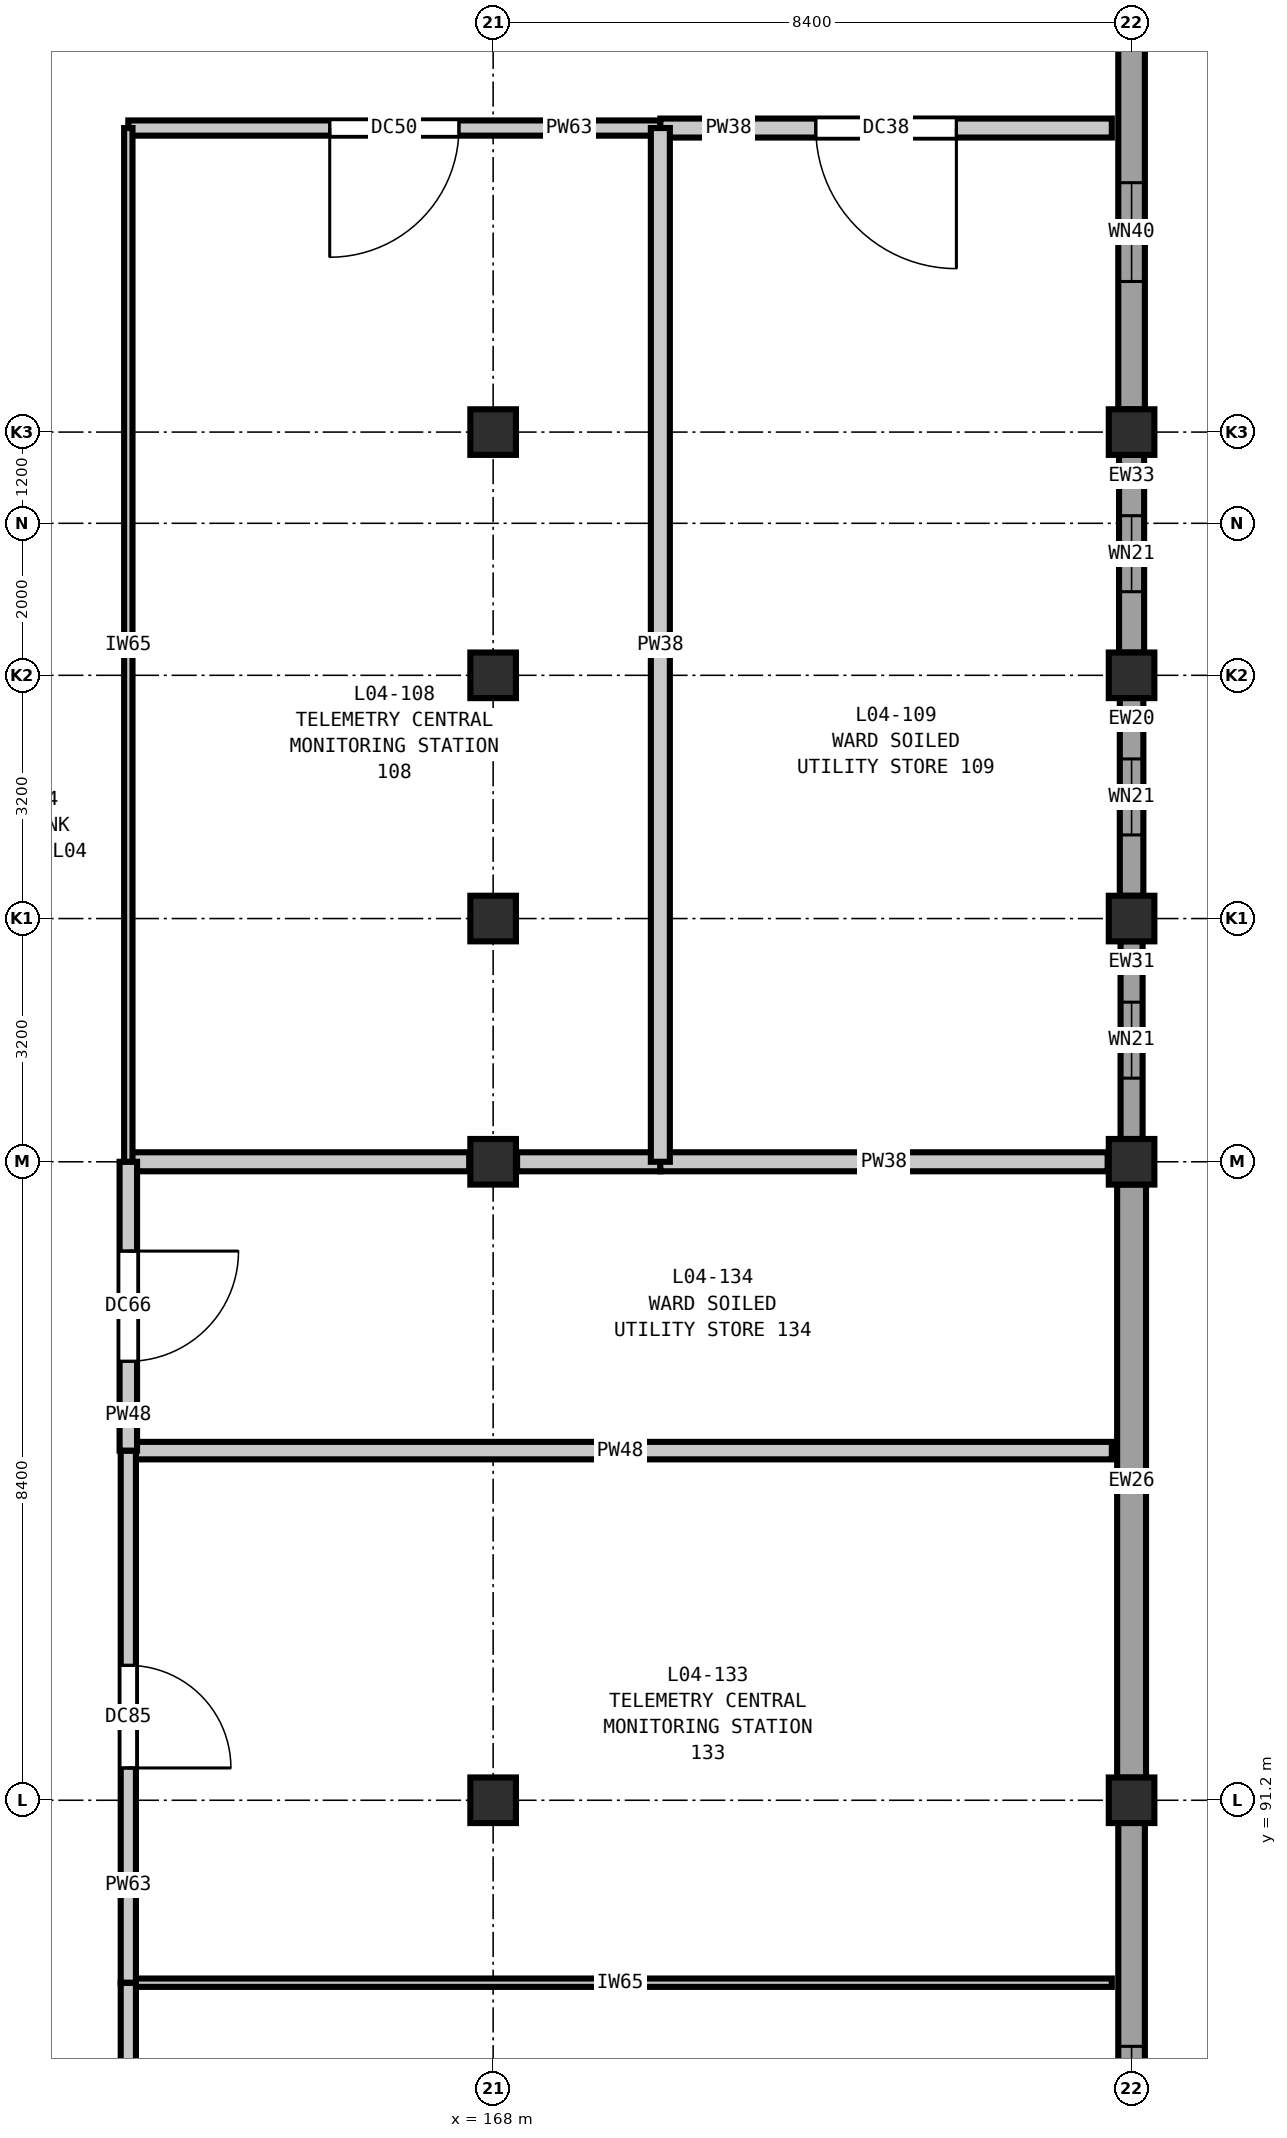
"""IFC4 building model, lengths in metres.
Left out: names, types, materials, properties, quantities, classifications, styles, units other than length and angle.
Written with IfcOpenShell. Run it as: python <this file> out.ifc"""

import sys

from ifc_helpers import new_model, si_unit, direction, frame, frame_2d, origin, origin_2d, place, context, subcontext, project, spatial, rectangle, extrude, element, fill, save


model = new_model("IFC4")
c1 = context("Model", 3, precision=1e-05, world=origin(), true_north=direction((0.0, 1.0)))
c2 = subcontext(c1, "Body", "Model", "MODEL_VIEW")
j1 = project(units=[si_unit("LENGTHUNIT", "METRE"), si_unit("PLANEANGLEUNIT", "RADIAN")], contexts=[c1])
p1 = place(None, origin())
s1 = spatial("IfcSite", under=j1, at=p1, CompositionType="ELEMENT")
p2 = place(p1, origin())
s2 = spatial("IfcBuilding", under=s1, at=p2, CompositionType="ELEMENT")
p3 = place(p2, frame((0.0, 0.0, 20.4)))
s3 = spatial("IfcBuildingStorey", under=s2, at=p3, CompositionType="ELEMENT", Elevation=20.4)
for number, where, z_axis, x_axis in (
    (1, (168.0, 91.2, 0.0), (0.0, 0.0, 1.0), (1.0, 0.0, 0.0)),
    (2, (168.0, 99.6, 0.0), (0.0, 0.0, 1.0), (1.0, 0.0, 0.0)),
    (3, (168.0, 102.8, 0.0), (0.0, 0.0, 1.0), (1.0, 0.0, 0.0)),
    (4, (168.0, 106.0, 0.0), (0.0, 0.0, 1.0), (1.0, 0.0, 0.0)),
    (5, (168.0, 109.2, 0.0), (0.0, 0.0, 1.0), (1.0, 0.0, 0.0)),
    (6, (176.4, 91.2, 0.0), (0.0, 0.0, 1.0), (1.0, 0.0, 0.0)),
    (7, (176.4, 99.6, 0.0), (0.0, 0.0, 1.0), (1.0, 0.0, 0.0)),
    (8, (176.4, 102.8, 0.0), (0.0, 0.0, 1.0), (1.0, 0.0, 0.0)),
    (9, (176.4, 106.0, 0.0), (0.0, 0.0, 1.0), (1.0, 0.0, 0.0)),
    (10, (176.4, 109.2, 0.0), (0.0, 0.0, 1.0), (1.0, 0.0, 0.0)),
):
    element("IfcColumn", number, at=place(p3, frame(where, z_axis=z_axis, x_axis=x_axis)), inside=s3, PredefinedType="COLUMN", context=c2, shape_type="SweptSolid", body=[
        extrude(rectangle(XDim=0.6, YDim=0.6, at=origin_2d()), origin(), (0.0, 0.0, 1.0), 4.2),
    ])
p4 = place(p3, frame((176.4, 116.102, 0.0), z_axis=(0.0, 0.0, 1.0), x_axis=(0.0, -1.0, 0.0)))
e11 = element("IfcWall", 11, at=p4, inside=s3, PredefinedType="SOLIDWALL", context=c2, shape_type="SweptSolid", body=[
    extrude(rectangle(XDim=6.604, YDim=0.35, at=frame_2d((3.302, 0.0))), origin(), (0.0, 0.0, 1.0), 3.48),
])
p5 = place(p4, frame((3.621, 0.0, 0.9)))
e12 = element("IfcOpeningElement", 12, at=p5, cuts=e11, PredefinedType="OPENING", context=c2, shape_type="SweptSolid", body=[
    extrude(rectangle(XDim=1.3, YDim=1.75, at=frame_2d((0.65, 0.875))), frame((0.0, 0.185, 0.0), z_axis=(0.0, -1.0, 0.0), x_axis=(1.0, 0.0, 0.0)), (0.0, 0.0, 1.0), 0.37),
])
p6 = place(p3, frame((176.4, 108.902, 0.0), z_axis=(0.0, 0.0, 1.0), x_axis=(0.0, -1.0, 0.0)))
e13 = element("IfcWall", 13, at=p6, inside=s3, PredefinedType="SOLIDWALL", context=c2, shape_type="SweptSolid", body=[
    extrude(rectangle(XDim=2.604, YDim=0.33, at=frame_2d((1.302, 0.0))), origin(), (0.0, 0.0, 1.0), 3.48),
])
p7 = place(p6, frame((0.802, 0.0, 0.9)))
e14 = element("IfcOpeningElement", 14, at=p7, cuts=e13, PredefinedType="OPENING", context=c2, shape_type="SweptSolid", body=[
    extrude(rectangle(XDim=1.0, YDim=1.55, at=frame_2d((0.5, 0.775))), frame((0.0, 0.175, 0.0), z_axis=(0.0, -1.0, 0.0), x_axis=(1.0, 0.0, 0.0)), (0.0, 0.0, 1.0), 0.35),
])
p8 = place(p3, frame((176.4, 105.702, 0.0), z_axis=(0.0, 0.0, 1.0), x_axis=(0.0, -1.0, 0.0)))
e15 = element("IfcWall", 15, at=p8, inside=s3, PredefinedType="SOLIDWALL", context=c2, shape_type="SweptSolid", body=[
    extrude(rectangle(XDim=2.604, YDim=0.31, at=frame_2d((1.302, 0.0))), origin(), (0.0, 0.0, 1.0), 3.48),
])
p9 = place(p8, frame((0.802, 0.0, 0.9)))
e16 = element("IfcOpeningElement", 16, at=p9, cuts=e15, PredefinedType="OPENING", context=c2, shape_type="SweptSolid", body=[
    extrude(rectangle(XDim=1.0, YDim=1.55, at=frame_2d((0.5, 0.775))), frame((0.0, 0.165, 0.0), z_axis=(0.0, -1.0, 0.0), x_axis=(1.0, 0.0, 0.0)), (0.0, 0.0, 1.0), 0.33),
])
p10 = place(p3, frame((176.4, 102.502, 0.0), z_axis=(0.0, 0.0, 1.0), x_axis=(0.0, -1.0, 0.0)))
e17 = element("IfcWall", 17, at=p10, inside=s3, PredefinedType="SOLIDWALL", context=c2, shape_type="SweptSolid", body=[
    extrude(rectangle(XDim=2.604, YDim=0.29, at=frame_2d((1.302, 0.0))), origin(), (0.0, 0.0, 1.0), 3.48),
])
p11 = place(p10, frame((0.802, 0.0, 0.9)))
e18 = element("IfcOpeningElement", 18, at=p11, cuts=e17, PredefinedType="OPENING", context=c2, shape_type="SweptSolid", body=[
    extrude(rectangle(XDim=1.0, YDim=1.55, at=frame_2d((0.5, 0.775))), frame((0.0, 0.155, 0.0), z_axis=(0.0, -1.0, 0.0), x_axis=(1.0, 0.0, 0.0)), (0.0, 0.0, 1.0), 0.31),
])
p12 = place(p3, frame((176.4, 99.302, 0.0), z_axis=(0.0, 0.0, 1.0), x_axis=(0.0, -1.0, 0.0)))
e19 = element("IfcWall", 19, at=p12, inside=s3, PredefinedType="SOLIDWALL", context=c2, shape_type="SweptSolid", body=[
    extrude(rectangle(XDim=7.804, YDim=0.38, at=frame_2d((3.902, 0.0))), origin(), (0.0, 0.0, 1.0), 3.48),
])
p13 = place(p3, frame((176.4, 90.902, 0.0), z_axis=(0.0, 0.0, 1.0), x_axis=(0.0, -1.0, 0.0)))
e20 = element("IfcWall", 20, at=p13, inside=s3, PredefinedType="SOLIDWALL", context=c2, shape_type="SweptSolid", body=[
    extrude(rectangle(XDim=7.829, YDim=0.35, at=frame_2d((3.915, 0.0))), origin(), (0.0, 0.0, 1.0), 3.48),
])
p14 = place(p13, frame((2.939, 0.0, 0.9)))
e21 = element("IfcOpeningElement", 21, at=p14, cuts=e20, PredefinedType="OPENING", context=c2, shape_type="SweptSolid", body=[
    extrude(rectangle(XDim=1.95, YDim=1.75, at=frame_2d((0.975, 0.875))), frame((0.0, 0.185, 0.0), z_axis=(0.0, -1.0, 0.0), x_axis=(1.0, 0.0, 0.0)), (0.0, 0.0, 1.0), 0.37),
])
p15 = place(p3, frame((163.2, 88.8, 0.0), z_axis=(0.0, 0.0, 1.0), x_axis=(1.0, 0.0, 0.0)))
e22 = element("IfcWall", 22, at=p15, inside=s3, PredefinedType="PARTITIONING", context=c2, shape_type="SweptSolid", body=[
    extrude(rectangle(XDim=12.94, YDim=0.11, at=frame_2d((6.47, 0.0))), origin(), (0.0, 0.0, 1.0), 3.82),
])
p16 = place(p3, frame((163.2, 95.8, 0.0), z_axis=(0.0, 0.0, 1.0), x_axis=(1.0, 0.0, 0.0)))
e23 = element("IfcWall", 23, at=p16, inside=s3, PredefinedType="PARTITIONING", context=c2, shape_type="SweptSolid", body=[
    extrude(rectangle(XDim=12.94, YDim=0.23, at=frame_2d((6.47, 0.0))), origin(), (0.0, 0.0, 1.0), 3.82),
])
p17 = place(p3, frame((163.2, 99.6, 0.0), z_axis=(0.0, 0.0, 1.0), x_axis=(1.0, 0.0, 0.0)))
e24 = element("IfcWall", 24, at=p17, inside=s3, PredefinedType="PARTITIONING", context=c2, shape_type="SweptSolid", body=[
    extrude(rectangle(XDim=4.485, YDim=0.25, at=frame_2d((2.243, 0.0))), origin(), (0.0, 0.0, 1.0), 3.585),
])
p18 = place(p3, frame((168.315, 99.6, 0.0), z_axis=(0.0, 0.0, 1.0), x_axis=(1.0, 0.0, 0.0)))
e25 = element("IfcWall", 25, at=p18, inside=s3, PredefinedType="PARTITIONING", context=c2, shape_type="SweptSolid", body=[
    extrude(rectangle(XDim=1.885, YDim=0.25, at=frame_2d((0.942, 0.0))), origin(), (0.0, 0.0, 1.0), 3.585),
])
p19 = place(p3, frame((170.2, 99.6, 0.0), z_axis=(0.0, 0.0, 1.0), x_axis=(1.0, 0.0, 0.0)))
e26 = element("IfcWall", 26, at=p19, inside=s3, PredefinedType="PARTITIONING", context=c2, shape_type="SweptSolid", body=[
    extrude(rectangle(XDim=5.885, YDim=0.25, at=frame_2d((2.942, 0.0))), origin(), (0.0, 0.0, 1.0), 3.585),
])
p20 = place(p3, frame((163.2, 113.2, 0.0), z_axis=(0.0, 0.0, 1.0), x_axis=(1.0, 0.0, 0.0)))
e27 = element("IfcWall", 27, at=p20, inside=s3, PredefinedType="PARTITIONING", context=c2, shape_type="SweptSolid", body=[
    extrude(rectangle(XDim=7.0, YDim=0.2, at=frame_2d((3.5, 0.0))), origin(), (0.0, 0.0, 1.0), 3.82),
])
p21 = place(p20, frame((2.65, 0.0, 0.0)))
e28 = element("IfcOpeningElement", 28, at=p21, cuts=e27, PredefinedType="OPENING", context=c2, shape_type="SweptSolid", body=[
    extrude(rectangle(XDim=1.7, YDim=2.3, at=frame_2d((0.85, 1.15))), frame((0.0, 0.11, 0.0), z_axis=(0.0, -1.0, 0.0), x_axis=(1.0, 0.0, 0.0)), (0.0, 0.0, 1.0), 0.22),
])
p22 = place(p3, frame((170.2, 113.2, 0.0), z_axis=(0.0, 0.0, 1.0), x_axis=(1.0, 0.0, 0.0)))
e29 = element("IfcWall", 29, at=p22, inside=s3, PredefinedType="PARTITIONING", context=c2, shape_type="SweptSolid", body=[
    extrude(rectangle(XDim=5.94, YDim=0.25, at=frame_2d((2.97, 0.0))), origin(), (0.0, 0.0, 1.0), 3.82),
])
p23 = place(p22, frame((2.045, 0.0, 0.0)))
e30 = element("IfcOpeningElement", 30, at=p23, cuts=e29, PredefinedType="OPENING", context=c2, shape_type="SweptSolid", body=[
    extrude(rectangle(XDim=1.85, YDim=2.3, at=frame_2d((0.925, 1.15))), frame((0.0, 0.135, 0.0), z_axis=(0.0, -1.0, 0.0), x_axis=(1.0, 0.0, 0.0)), (0.0, 0.0, 1.0), 0.27),
])
p24 = place(p3, frame((163.2, 82.8, 0.0), z_axis=(0.0, 0.0, 1.0), x_axis=(0.0, 1.0, 0.0)))
e31 = element("IfcWall", 31, at=p24, inside=s3, PredefinedType="PARTITIONING", context=c2, shape_type="SweptSolid", body=[
    extrude(rectangle(XDim=6.0, YDim=0.2, at=frame_2d((3.0, 0.0))), origin(), (0.0, 0.0, 1.0), 3.82),
])
p25 = place(p24, frame((2.35, 0.0, 0.0)))
e32 = element("IfcOpeningElement", 32, at=p25, cuts=e31, PredefinedType="OPENING", context=c2, shape_type="SweptSolid", body=[
    extrude(rectangle(XDim=1.3, YDim=2.2, at=frame_2d((0.65, 1.1))), frame((0.0, 0.11, 0.0), z_axis=(0.0, -1.0, 0.0), x_axis=(1.0, 0.0, 0.0)), (0.0, 0.0, 1.0), 0.22),
])
p26 = place(p3, frame((163.2, 88.8, 0.0), z_axis=(0.0, 0.0, 1.0), x_axis=(0.0, 1.0, 0.0)))
e33 = element("IfcWall", 33, at=p26, inside=s3, PredefinedType="PARTITIONING", context=c2, shape_type="SweptSolid", body=[
    extrude(rectangle(XDim=7.0, YDim=0.2, at=frame_2d((3.5, 0.0))), origin(), (0.0, 0.0, 1.0), 3.82),
])
p27 = place(p26, frame((2.825, 0.0, 0.0)))
e34 = element("IfcOpeningElement", 34, at=p27, cuts=e33, PredefinedType="OPENING", context=c2, shape_type="SweptSolid", body=[
    extrude(rectangle(XDim=1.35, YDim=2.2, at=frame_2d((0.675, 1.1))), frame((0.0, 0.11, 0.0), z_axis=(0.0, -1.0, 0.0), x_axis=(1.0, 0.0, 0.0)), (0.0, 0.0, 1.0), 0.22),
])
p28 = place(p3, frame((163.2, 95.8, 0.0), z_axis=(0.0, 0.0, 1.0), x_axis=(0.0, 1.0, 0.0)))
e35 = element("IfcWall", 35, at=p28, inside=s3, PredefinedType="PARTITIONING", context=c2, shape_type="SweptSolid", body=[
    extrude(rectangle(XDim=3.8, YDim=0.23, at=frame_2d((1.9, 0.0))), origin(), (0.0, 0.0, 1.0), 3.82),
])
p29 = place(p28, frame((1.175, 0.0, 0.0)))
e36 = element("IfcOpeningElement", 36, at=p29, cuts=e35, PredefinedType="OPENING", context=c2, shape_type="SweptSolid", body=[
    extrude(rectangle(XDim=1.45, YDim=2.25, at=frame_2d((0.725, 1.125))), frame((0.0, 0.125, 0.0), z_axis=(0.0, -1.0, 0.0), x_axis=(1.0, 0.0, 0.0)), (0.0, 0.0, 1.0), 0.25),
])
p30 = place(p3, frame((163.2, 99.6, 0.0), z_axis=(0.0, 0.0, 1.0), x_axis=(0.0, 1.0, 0.0)))
e37 = element("IfcWall", 37, at=p30, inside=s3, PredefinedType="PARTITIONING", context=c2, shape_type="SweptSolid", body=[
    extrude(rectangle(XDim=13.6, YDim=0.11, at=frame_2d((6.8, 0.0))), origin(), (0.0, 0.0, 1.0), 3.82),
])
p31 = place(p3, frame((170.2, 99.6, 0.0), z_axis=(0.0, 0.0, 1.0), x_axis=(0.0, 1.0, 0.0)))
e38 = element("IfcWall", 38, at=p31, inside=s3, PredefinedType="PARTITIONING", context=c2, shape_type="SweptSolid", body=[
    extrude(rectangle(XDim=13.6, YDim=0.25, at=frame_2d((6.8, 0.0))), origin(), (0.0, 0.0, 1.0), 3.82),
])
p32 = place(p5, origin())
e39 = element("IfcWindow", 39, at=p32, inside=s3, PartitioningType="SINGLE_PANEL", PredefinedType="WINDOW", context=c2, shape_type="SweptSolid", body=[
    extrude(rectangle(XDim=1.3, YDim=1.75, at=frame_2d((0.65, 0.875))), frame((0.0, 0.03, 0.0), z_axis=(0.0, -1.0, 0.0), x_axis=(1.0, 0.0, 0.0)), (0.0, 0.0, 1.0), 0.06),
])
fill(e12, e39)
p33 = place(p7, origin())
e40 = element("IfcWindow", 40, at=p33, inside=s3, PartitioningType="SINGLE_PANEL", PredefinedType="WINDOW", context=c2, shape_type="SweptSolid", body=[
    extrude(rectangle(XDim=1.0, YDim=1.55, at=frame_2d((0.5, 0.775))), frame((0.0, 0.03, 0.0), z_axis=(0.0, -1.0, 0.0), x_axis=(1.0, 0.0, 0.0)), (0.0, 0.0, 1.0), 0.06),
])
fill(e14, e40)
p34 = place(p9, origin())
e41 = element("IfcWindow", 41, at=p34, inside=s3, PartitioningType="SINGLE_PANEL", PredefinedType="WINDOW", context=c2, shape_type="SweptSolid", body=[
    extrude(rectangle(XDim=1.0, YDim=1.55, at=frame_2d((0.5, 0.775))), frame((0.0, 0.03, 0.0), z_axis=(0.0, -1.0, 0.0), x_axis=(1.0, 0.0, 0.0)), (0.0, 0.0, 1.0), 0.06),
])
fill(e16, e41)
p35 = place(p11, origin())
e42 = element("IfcWindow", 42, at=p35, inside=s3, PartitioningType="SINGLE_PANEL", PredefinedType="WINDOW", context=c2, shape_type="SweptSolid", body=[
    extrude(rectangle(XDim=1.0, YDim=1.55, at=frame_2d((0.5, 0.775))), frame((0.0, 0.03, 0.0), z_axis=(0.0, -1.0, 0.0), x_axis=(1.0, 0.0, 0.0)), (0.0, 0.0, 1.0), 0.06),
])
fill(e18, e42)
p36 = place(p14, origin())
e43 = element("IfcWindow", 43, at=p36, inside=s3, PartitioningType="DOUBLE_PANEL_VERTICAL", PredefinedType="WINDOW", context=c2, shape_type="SweptSolid", body=[
    extrude(rectangle(XDim=1.95, YDim=1.75, at=frame_2d((0.975, 0.875))), frame((0.0, 0.03, 0.0), z_axis=(0.0, -1.0, 0.0), x_axis=(1.0, 0.0, 0.0)), (0.0, 0.0, 1.0), 0.06),
])
fill(e21, e43)
p37 = place(p21, frame((1.7, 0.0, 0.0), z_axis=(0.0, 0.0, 1.0), x_axis=(-1.0, 0.0, 0.0)))
e44 = element("IfcDoor", 44, at=p37, inside=s3, OperationType="SINGLE_SWING_RIGHT", PredefinedType="DOOR", context=c2, shape_type="SweptSolid", body=[
    extrude(rectangle(XDim=1.7, YDim=2.3, at=frame_2d((0.85, 1.15))), frame((0.0, 0.025, 0.0), z_axis=(0.0, -1.0, 0.0), x_axis=(1.0, 0.0, 0.0)), (0.0, 0.0, 1.0), 0.05),
])
fill(e28, e44)
p38 = place(p23, frame((1.85, 0.0, 0.0), z_axis=(0.0, 0.0, 1.0), x_axis=(-1.0, 0.0, 0.0)))
e45 = element("IfcDoor", 45, at=p38, inside=s3, OperationType="SINGLE_SWING_LEFT", PredefinedType="DOOR", context=c2, shape_type="SweptSolid", body=[
    extrude(rectangle(XDim=1.85, YDim=2.3, at=frame_2d((0.925, 1.15))), frame((0.0, 0.025, 0.0), z_axis=(0.0, -1.0, 0.0), x_axis=(1.0, 0.0, 0.0)), (0.0, 0.0, 1.0), 0.05),
])
fill(e30, e45)
p39 = place(p27, frame((1.35, 0.0, 0.0), z_axis=(0.0, 0.0, 1.0), x_axis=(-1.0, 0.0, 0.0)))
e46 = element("IfcDoor", 46, at=p39, inside=s3, OperationType="SINGLE_SWING_RIGHT", PredefinedType="DOOR", context=c2, shape_type="SweptSolid", body=[
    extrude(rectangle(XDim=1.35, YDim=2.2, at=frame_2d((0.675, 1.1))), frame((0.0, 0.025, 0.0), z_axis=(0.0, -1.0, 0.0), x_axis=(1.0, 0.0, 0.0)), (0.0, 0.0, 1.0), 0.05),
])
fill(e34, e46)
p40 = place(p29, frame((1.45, 0.0, 0.0), z_axis=(0.0, 0.0, 1.0), x_axis=(-1.0, 0.0, 0.0)))
e47 = element("IfcDoor", 47, at=p40, inside=s3, OperationType="SINGLE_SWING_LEFT", PredefinedType="DOOR", context=c2, shape_type="SweptSolid", body=[
    extrude(rectangle(XDim=1.45, YDim=2.25, at=frame_2d((0.725, 1.125))), frame((0.0, 0.025, 0.0), z_axis=(0.0, -1.0, 0.0), x_axis=(1.0, 0.0, 0.0)), (0.0, 0.0, 1.0), 0.05),
])
fill(e36, e47)
save(model, sys.argv[1])
